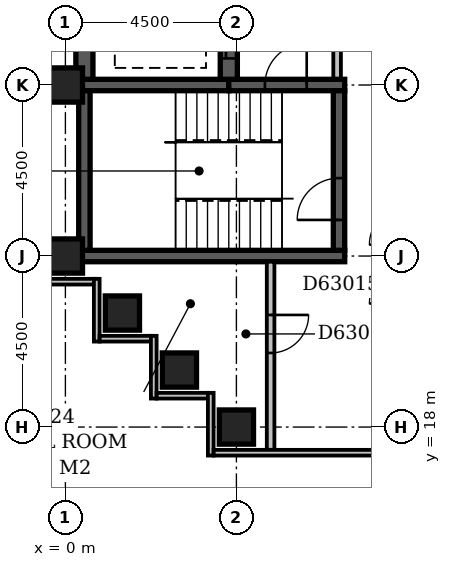
"""IFC4 building model, lengths in metres.
Left out: names, types, materials, properties, quantities, classifications, styles, units other than length and angle.
Written with IfcOpenShell. Run it as: python <this file> out.ifc"""

import sys

from ifc_helpers import new_model, si_unit, direction, frame, frame_2d, origin, origin_2d, place, context, subcontext, project, spatial, rectangle, extrude, element, fill, save


model = new_model("IFC4")
c1 = context("Model", 3, precision=1e-05, world=origin(), true_north=direction((0.0, 1.0)))
c2 = subcontext(c1, "Body", "Model", "MODEL_VIEW")
j1 = project(units=[si_unit("LENGTHUNIT", "METRE"), si_unit("PLANEANGLEUNIT", "RADIAN")], contexts=[c1])
p1 = place(None, origin())
s1 = spatial("IfcSite", under=j1, at=p1, CompositionType="ELEMENT")
p2 = place(p1, origin())
s2 = spatial("IfcBuilding", under=s1, at=p2, CompositionType="ELEMENT")
p3 = place(p2, frame((0.0, 0.0, 243.8)))
s3 = spatial("IfcBuildingStorey", under=s2, at=p3, CompositionType="ELEMENT", Elevation=243.8)
p4 = place(p3, frame((0.35, 22.5, -0.3), z_axis=(0.0, 0.0, 1.0), x_axis=(1.0, 0.0, 0.0)))
e1 = element("IfcWall", 1, at=p4, inside=s3, PredefinedType="SHEAR", context=c2, shape_type="SweptSolid", body=[
    extrude(rectangle(XDim=7.0, YDim=0.3, at=frame_2d((3.5, 0.0))), origin(), (0.0, 0.0, 1.0), 3.6),
])
p5 = place(p3, frame((0.35, 27.0, -0.3), z_axis=(0.0, 0.0, 1.0), x_axis=(1.0, 0.0, 0.0)))
e2 = element("IfcWall", 2, at=p5, inside=s3, PredefinedType="SHEAR", context=c2, shape_type="SweptSolid", body=[
    extrude(rectangle(XDim=3.95, YDim=0.3, at=frame_2d((1.975, 0.0))), origin(), (0.0, 0.0, 1.0), 3.6),
])
p6 = place(p3, frame((0.5, 22.65, -0.3), z_axis=(0.0, 0.0, 1.0), x_axis=(0.0, 1.0, 0.0)))
e3 = element("IfcWall", 3, at=p6, inside=s3, PredefinedType="SHEAR", context=c2, shape_type="SweptSolid", body=[
    extrude(rectangle(XDim=4.2, YDim=0.3, at=frame_2d((2.1, 0.0))), origin(), (0.0, 0.0, 1.0), 3.6),
])
p7 = place(p3, frame((0.5, 27.15, -0.3), z_axis=(0.0, 0.0, 1.0), x_axis=(0.0, 1.0, 0.0)))
e4 = element("IfcWall", 4, at=p7, inside=s3, PredefinedType="SHEAR", context=c2, shape_type="SweptSolid", body=[
    extrude(rectangle(XDim=22.125, YDim=0.45, at=frame_2d((11.062, 0.0))), origin(), (0.0, 0.0, 1.0), 3.6),
])
p8 = place(p3, frame((4.3, 27.0, -0.3), z_axis=(0.0, 0.0, 1.0), x_axis=(1.0, 0.0, 0.0)))
e5 = element("IfcWall", 5, at=p8, inside=s3, PredefinedType="SHEAR", context=c2, shape_type="SweptSolid", body=[
    extrude(rectangle(XDim=3.05, YDim=0.3, at=frame_2d((1.525, 0.0))), origin(), (0.0, 0.0, 1.0), 3.6),
])
p9 = place(p8, frame((0.95, 0.0, 0.3)))
e6 = element("IfcOpeningElement", 6, at=p9, cuts=e5, PredefinedType="OPENING", context=c2, shape_type="SweptSolid", body=[
    extrude(rectangle(XDim=1.1, YDim=2.1, at=frame_2d((0.55, 1.05))), frame((0.0, 0.162, 0.0), z_axis=(0.0, -1.0, 0.0), x_axis=(1.0, 0.0, 0.0)), (0.0, 0.0, 1.0), 0.324),
])
p10 = place(p3, frame((4.3, 27.15, -0.3), z_axis=(0.0, 0.0, 1.0), x_axis=(0.0, 1.0, 0.0)))
e7 = element("IfcWall", 7, at=p10, inside=s3, PredefinedType="SHEAR", context=c2, shape_type="SweptSolid", body=[
    extrude(rectangle(XDim=22.125, YDim=0.45, at=frame_2d((11.062, 0.0))), origin(), (0.0, 0.0, 1.0), 3.6),
])
p11 = place(p10, frame((3.05, 0.0, 0.3)))
e8 = element("IfcOpeningElement", 8, at=p11, cuts=e7, PredefinedType="OPENING", context=c2, shape_type="SweptSolid", body=[
    extrude(rectangle(XDim=1.1, YDim=2.1, at=frame_2d((0.55, 1.05))), frame((0.0, 0.237, 0.0), z_axis=(0.0, -1.0, 0.0), x_axis=(1.0, 0.0, 0.0)), (0.0, 0.0, 1.0), 0.474),
])
p12 = place(p10, frame((0.55, 0.0, 0.3)))
e9 = element("IfcOpeningElement", 9, at=p12, cuts=e7, PredefinedType="OPENING", context=c2, shape_type="SweptSolid", body=[
    extrude(rectangle(XDim=1.1, YDim=2.1, at=frame_2d((0.55, 1.05))), frame((0.0, 0.237, 0.0), z_axis=(0.0, -1.0, 0.0), x_axis=(1.0, 0.0, 0.0)), (0.0, 0.0, 1.0), 0.474),
])
p13 = place(p10, frame((20.55, 0.0, 0.3)))
e10 = element("IfcOpeningElement", 10, at=p13, cuts=e7, PredefinedType="OPENING", context=c2, shape_type="SweptSolid", body=[
    extrude(rectangle(XDim=1.1, YDim=2.1, at=frame_2d((0.55, 1.05))), frame((0.0, 0.237, 0.0), z_axis=(0.0, -1.0, 0.0), x_axis=(1.0, 0.0, 0.0)), (0.0, 0.0, 1.0), 0.474),
])
p14 = place(p10, frame((18.05, 0.0, 0.3)))
e11 = element("IfcOpeningElement", 11, at=p14, cuts=e7, PredefinedType="OPENING", context=c2, shape_type="SweptSolid", body=[
    extrude(rectangle(XDim=1.1, YDim=2.1, at=frame_2d((0.55, 1.05))), frame((0.0, 0.237, 0.0), z_axis=(0.0, -1.0, 0.0), x_axis=(1.0, 0.0, 0.0)), (0.0, 0.0, 1.0), 0.474),
])
p15 = place(p10, frame((15.55, 0.0, 0.3)))
e12 = element("IfcOpeningElement", 12, at=p15, cuts=e7, PredefinedType="OPENING", context=c2, shape_type="SweptSolid", body=[
    extrude(rectangle(XDim=1.1, YDim=2.1, at=frame_2d((0.55, 1.05))), frame((0.0, 0.237, 0.0), z_axis=(0.0, -1.0, 0.0), x_axis=(1.0, 0.0, 0.0)), (0.0, 0.0, 1.0), 0.474),
])
p16 = place(p10, frame((13.05, 0.0, 0.3)))
e13 = element("IfcOpeningElement", 13, at=p16, cuts=e7, PredefinedType="OPENING", context=c2, shape_type="SweptSolid", body=[
    extrude(rectangle(XDim=1.1, YDim=2.1, at=frame_2d((0.55, 1.05))), frame((0.0, 0.237, 0.0), z_axis=(0.0, -1.0, 0.0), x_axis=(1.0, 0.0, 0.0)), (0.0, 0.0, 1.0), 0.474),
])
p17 = place(p10, frame((10.55, 0.0, 0.3)))
e14 = element("IfcOpeningElement", 14, at=p17, cuts=e7, PredefinedType="OPENING", context=c2, shape_type="SweptSolid", body=[
    extrude(rectangle(XDim=1.1, YDim=2.1, at=frame_2d((0.55, 1.05))), frame((0.0, 0.237, 0.0), z_axis=(0.0, -1.0, 0.0), x_axis=(1.0, 0.0, 0.0)), (0.0, 0.0, 1.0), 0.474),
])
p18 = place(p10, frame((8.05, 0.0, 0.3)))
e15 = element("IfcOpeningElement", 15, at=p18, cuts=e7, PredefinedType="OPENING", context=c2, shape_type="SweptSolid", body=[
    extrude(rectangle(XDim=1.1, YDim=2.1, at=frame_2d((0.55, 1.05))), frame((0.0, 0.237, 0.0), z_axis=(0.0, -1.0, 0.0), x_axis=(1.0, 0.0, 0.0)), (0.0, 0.0, 1.0), 0.474),
])
p19 = place(p10, frame((5.55, 0.0, 0.3)))
e16 = element("IfcOpeningElement", 16, at=p19, cuts=e7, PredefinedType="OPENING", context=c2, shape_type="SweptSolid", body=[
    extrude(rectangle(XDim=1.1, YDim=2.1, at=frame_2d((0.55, 1.05))), frame((0.0, 0.237, 0.0), z_axis=(0.0, -1.0, 0.0), x_axis=(1.0, 0.0, 0.0)), (0.0, 0.0, 1.0), 0.474),
])
p20 = place(p3, frame((7.2, 22.65, -0.3), z_axis=(0.0, 0.0, 1.0), x_axis=(0.0, 1.0, 0.0)))
e17 = element("IfcWall", 17, at=p20, inside=s3, PredefinedType="SHEAR", context=c2, shape_type="SweptSolid", body=[
    extrude(rectangle(XDim=4.2, YDim=0.3, at=frame_2d((2.1, 0.0))), origin(), (0.0, 0.0, 1.0), 3.6),
])
p21 = place(p20, frame((0.8, 0.0, 0.3)))
e18 = element("IfcOpeningElement", 18, at=p21, cuts=e17, PredefinedType="OPENING", context=c2, shape_type="SweptSolid", body=[
    extrude(rectangle(XDim=1.1, YDim=2.1, at=frame_2d((0.55, 1.05))), frame((0.0, 0.162, 0.0), z_axis=(0.0, -1.0, 0.0), x_axis=(1.0, 0.0, 0.0)), (0.0, 0.0, 1.0), 0.324),
])
for number, where, z_axis, x_axis in (
    (19, (4.5, 18.0, -0.3), (0.0, 0.0, 1.0), (1.0, 0.0, 0.0)),
    (20, (3.0, 19.5, -0.3), (0.0, 0.0, 1.0), (1.0, 0.0, 0.0)),
    (21, (1.5, 21.0, -0.3), (0.0, 0.0, 1.0), (1.0, 0.0, 0.0)),
    (22, (0.0, 22.5, -0.3), (0.0, 0.0, 1.0), (1.0, 0.0, 0.0)),
    (23, (0.0, 27.0, -0.3), (0.0, 0.0, 1.0), (1.0, 0.0, 0.0)),
):
    element("IfcColumn", number, at=place(p3, frame(where, z_axis=z_axis, x_axis=x_axis)), inside=s3, PredefinedType="COLUMN", context=c2, shape_type="SweptSolid", body=[
        extrude(rectangle(XDim=0.9, YDim=0.9, at=origin_2d()), origin(), (0.0, 0.0, 1.0), 3.6),
    ])
p22 = place(p3, frame((-0.6, 21.825, 0.0), z_axis=(0.0, 0.0, 1.0), x_axis=(1.0, 0.0, 0.0)))
e24 = element("IfcWall", 24, at=p22, inside=s3, PredefinedType="STANDARD", context=c2, shape_type="SweptSolid", body=[
    extrude(rectangle(XDim=1.35, YDim=0.15, at=frame_2d((0.675, 0.0))), origin(), (0.0, 0.0, 1.0), 2.7),
])
p23 = place(p3, frame((0.825, 21.9, 0.0), z_axis=(0.0, 0.0, 1.0), x_axis=(0.0, -1.0, 0.0)))
e25 = element("IfcWall", 25, at=p23, inside=s3, PredefinedType="STANDARD", context=c2, shape_type="SweptSolid", body=[
    extrude(rectangle(XDim=1.65, YDim=0.15, at=frame_2d((0.825, 0.0))), origin(), (0.0, 0.0, 1.0), 2.7),
])
p24 = place(p3, frame((0.9, 20.325, 0.0), z_axis=(0.0, 0.0, 1.0), x_axis=(1.0, 0.0, 0.0)))
e26 = element("IfcWall", 26, at=p24, inside=s3, PredefinedType="STANDARD", context=c2, shape_type="SweptSolid", body=[
    extrude(rectangle(XDim=1.35, YDim=0.15, at=frame_2d((0.675, 0.0))), origin(), (0.0, 0.0, 1.0), 2.7),
])
p25 = place(p3, frame((2.325, 20.4, 0.0), z_axis=(0.0, 0.0, 1.0), x_axis=(0.0, -1.0, 0.0)))
e27 = element("IfcWall", 27, at=p25, inside=s3, PredefinedType="STANDARD", context=c2, shape_type="SweptSolid", body=[
    extrude(rectangle(XDim=1.65, YDim=0.15, at=frame_2d((0.825, 0.0))), origin(), (0.0, 0.0, 1.0), 2.7),
])
p26 = place(p3, frame((2.4, 18.825, 0.0), z_axis=(0.0, 0.0, 1.0), x_axis=(1.0, 0.0, 0.0)))
e28 = element("IfcWall", 28, at=p26, inside=s3, PredefinedType="STANDARD", context=c2, shape_type="SweptSolid", body=[
    extrude(rectangle(XDim=1.35, YDim=0.15, at=frame_2d((0.675, 0.0))), origin(), (0.0, 0.0, 1.0), 2.7),
])
p27 = place(p3, frame((3.825, 18.9, 0.0), z_axis=(0.0, 0.0, 1.0), x_axis=(0.0, -1.0, 0.0)))
e29 = element("IfcWall", 29, at=p27, inside=s3, PredefinedType="STANDARD", context=c2, shape_type="SweptSolid", body=[
    extrude(rectangle(XDim=1.65, YDim=0.15, at=frame_2d((0.825, 0.0))), origin(), (0.0, 0.0, 1.0), 2.7),
])
p28 = place(p3, frame((3.9, 17.325, 0.0), z_axis=(0.0, 0.0, 1.0), x_axis=(1.0, 0.0, 0.0)))
e30 = element("IfcWall", 30, at=p28, inside=s3, PredefinedType="STANDARD", context=c2, shape_type="SweptSolid", body=[
    extrude(rectangle(XDim=19.35, YDim=0.15, at=frame_2d((9.675, 0.0))), origin(), (0.0, 0.0, 1.0), 2.7),
])
p29 = place(p28, frame((10.65, 0.0, 0.6)))
e31 = element("IfcOpeningElement", 31, at=p29, cuts=e30, PredefinedType="OPENING", context=c2, shape_type="SweptSolid", body=[
    extrude(rectangle(XDim=2.4, YDim=1.8, at=frame_2d((1.2, 0.9))), frame((0.0, 0.087, 0.0), z_axis=(0.0, -1.0, 0.0), x_axis=(1.0, 0.0, 0.0)), (0.0, 0.0, 1.0), 0.174),
])
p30 = place(p28, frame((15.15, 0.0, 0.6)))
e32 = element("IfcOpeningElement", 32, at=p30, cuts=e30, PredefinedType="OPENING", context=c2, shape_type="SweptSolid", body=[
    extrude(rectangle(XDim=2.4, YDim=1.8, at=frame_2d((1.2, 0.9))), frame((0.0, 0.087, 0.0), z_axis=(0.0, -1.0, 0.0), x_axis=(1.0, 0.0, 0.0)), (0.0, 0.0, 1.0), 0.174),
])
p31 = place(p3, frame((7.15, 27.17, 0.0), z_axis=(0.0, 0.0, 1.0), x_axis=(0.0, 1.0, 0.0)))
e33 = element("IfcWall", 33, at=p31, inside=s3, PredefinedType="PARTITIONING", context=c2, shape_type="SweptSolid", body=[
    extrude(rectangle(XDim=4.83, YDim=0.2, at=frame_2d((2.415, 0.0))), origin(), (0.0, 0.0, 1.0), 3.3),
])
p32 = place(p31, frame((1.73, 0.0, 0.0)))
e34 = element("IfcOpeningElement", 34, at=p32, cuts=e33, PredefinedType="OPENING", context=c2, shape_type="SweptSolid", body=[
    extrude(rectangle(XDim=1.2, YDim=2.1, at=frame_2d((0.6, 1.05))), frame((0.0, 0.112, 0.0), z_axis=(0.0, -1.0, 0.0), x_axis=(1.0, 0.0, 0.0)), (0.0, 0.0, 1.0), 0.224),
])
p33 = place(p3, frame((5.4, 17.4, 0.0), z_axis=(0.0, 0.0, 1.0), x_axis=(0.0, 1.0, 0.0)))
e35 = element("IfcWall", 35, at=p33, inside=s3, PredefinedType="PARTITIONING", context=c2, shape_type="SweptSolid", body=[
    extrude(rectangle(XDim=4.95, YDim=0.2, at=frame_2d((2.475, 0.0))), origin(), (0.0, 0.0, 1.0), 3.3),
])
p34 = place(p33, frame((2.55, 0.0, 0.0)))
e36 = element("IfcOpeningElement", 36, at=p34, cuts=e35, PredefinedType="OPENING", context=c2, shape_type="SweptSolid", body=[
    extrude(rectangle(XDim=1.0, YDim=2.1, at=frame_2d((0.5, 1.05))), frame((0.0, 0.112, 0.0), z_axis=(0.0, -1.0, 0.0), x_axis=(1.0, 0.0, 0.0)), (0.0, 0.0, 1.0), 0.224),
])
p35 = place(p12, origin())
e37 = element("IfcDoor", 37, at=p35, inside=s3, OperationType="SLIDING_TO_LEFT", PredefinedType="DOOR", context=c2, shape_type="SweptSolid", body=[
    extrude(rectangle(XDim=1.1, YDim=2.1, at=frame_2d((0.55, 1.05))), frame((0.0, 0.025, 0.0), z_axis=(0.0, -1.0, 0.0), x_axis=(1.0, 0.0, 0.0)), (0.0, 0.0, 1.0), 0.05),
])
fill(e9, e37)
p36 = place(p9, frame((1.1, 0.0, 0.0), z_axis=(0.0, 0.0, 1.0), x_axis=(-1.0, 0.0, 0.0)))
e38 = element("IfcDoor", 38, at=p36, inside=s3, OperationType="SINGLE_SWING_LEFT", PredefinedType="DOOR", context=c2, shape_type="SweptSolid", body=[
    extrude(rectangle(XDim=1.1, YDim=2.1, at=frame_2d((0.55, 1.05))), frame((0.0, 0.025, 0.0), z_axis=(0.0, -1.0, 0.0), x_axis=(1.0, 0.0, 0.0)), (0.0, 0.0, 1.0), 0.05),
])
fill(e6, e38)
p37 = place(p21, origin())
e39 = element("IfcDoor", 39, at=p37, inside=s3, OperationType="SINGLE_SWING_LEFT", PredefinedType="DOOR", context=c2, shape_type="SweptSolid", body=[
    extrude(rectangle(XDim=1.1, YDim=2.1, at=frame_2d((0.55, 1.05))), frame((0.0, 0.025, 0.0), z_axis=(0.0, -1.0, 0.0), x_axis=(1.0, 0.0, 0.0)), (0.0, 0.0, 1.0), 0.05),
])
fill(e18, e39)
p38 = place(p34, origin())
e40 = element("IfcDoor", 40, at=p38, inside=s3, OperationType="SINGLE_SWING_RIGHT", PredefinedType="DOOR", context=c2, shape_type="SweptSolid", body=[
    extrude(rectangle(XDim=1.0, YDim=2.1, at=frame_2d((0.5, 1.05))), frame((0.0, 0.025, 0.0), z_axis=(0.0, -1.0, 0.0), x_axis=(1.0, 0.0, 0.0)), (0.0, 0.0, 1.0), 0.05),
])
fill(e36, e40)
save(model, sys.argv[1])
